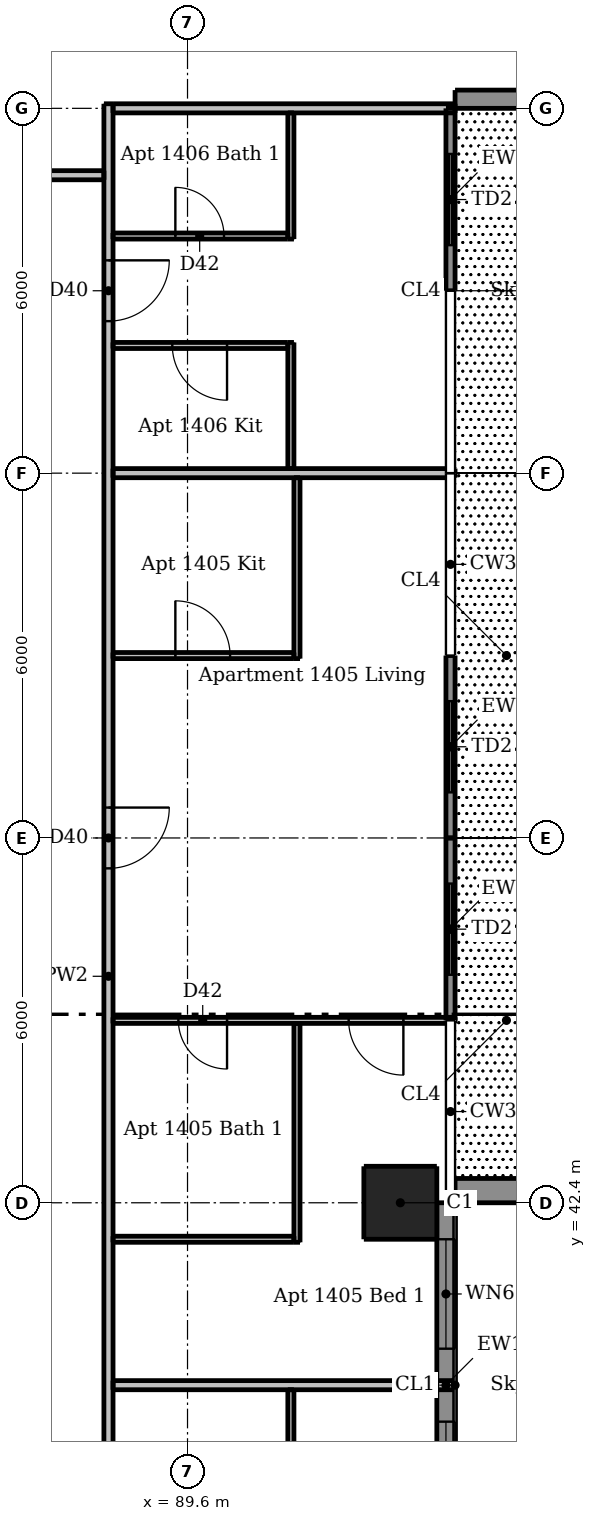
"""IFC4 building model, lengths in metres.
Left out: names, types, materials, properties, quantities, classifications, styles, units other than length and angle.
Written with IfcOpenShell. Run it as: python <this file> out.ifc"""

import sys

from ifc_helpers import new_model, si_unit, direction, frame, frame_2d, origin, origin_2d, place, context, subcontext, project, spatial, rectangle, extrude, element, fill, save


model = new_model("IFC4")
c1 = context("Model", 3, precision=1e-05, world=origin(), true_north=direction((0.0, 1.0)))
c2 = subcontext(c1, "Body", "Model", "MODEL_VIEW")
j1 = project(units=[si_unit("LENGTHUNIT", "METRE"), si_unit("PLANEANGLEUNIT", "RADIAN")], contexts=[c1])
p1 = place(None, origin())
s1 = spatial("IfcSite", under=j1, at=p1, CompositionType="ELEMENT")
p2 = place(p1, origin())
s2 = spatial("IfcBuilding", under=s1, at=p2, CompositionType="ELEMENT")
p3 = place(p2, frame((0.0, 0.0, 53.2)))
s3 = spatial("IfcBuildingStorey", under=s2, at=p3, CompositionType="ELEMENT", Elevation=53.2)
p4 = place(p3, frame((93.1, 42.4, 0.0), z_axis=(0.0, 0.0, 1.0), x_axis=(1.0, 0.0, 0.0)))
e1 = element("IfcColumn", 1, at=p4, inside=s3, PredefinedType="COLUMN", context=c2, shape_type="SweptSolid", body=[
    extrude(rectangle(XDim=1.2, YDim=1.2, at=origin_2d()), origin(), (0.0, 0.0, 1.0), 3.05),
])
p5 = place(p3, frame((94.0, 60.55, 0.0), z_axis=(0.0, 0.0, 1.0), x_axis=(1.0, 0.0, 0.0)))
e2 = element("IfcWall", 2, at=p5, inside=s3, PredefinedType="SOLIDWALL", context=c2, shape_type="SweptSolid", body=[
    extrude(rectangle(XDim=4.5, YDim=0.3, at=frame_2d((2.25, 0.0))), origin(), (0.0, 0.0, 1.0), 3.05),
])
p6 = place(p5, frame((1.05, 0.0, 0.15)))
e3 = element("IfcOpeningElement", 3, at=p6, cuts=e2, PredefinedType="OPENING", context=c2, shape_type="SweptSolid", body=[
    extrude(rectangle(XDim=2.4, YDim=2.1, at=frame_2d((1.2, 1.05))), frame((0.0, 0.16, 0.0), z_axis=(0.0, -1.0, 0.0), x_axis=(1.0, 0.0, 0.0)), (0.0, 0.0, 1.0), 0.32),
])
p7 = place(p3, frame((93.85, 36.4, 0.0), z_axis=(0.0, 0.0, 1.0), x_axis=(0.0, 1.0, 0.0)))
e4 = element("IfcWall", 4, at=p7, inside=s3, PredefinedType="SOLIDWALL", context=c2, shape_type="SweptSolid", body=[
    extrude(rectangle(XDim=6.0, YDim=0.3, at=frame_2d((3.0, 0.0))), origin(), (0.0, 0.0, 1.0), 3.05),
])
p8 = place(p7, frame((0.6, 0.0, 0.15)))
e5 = element("IfcOpeningElement", 5, at=p8, cuts=e4, PredefinedType="OPENING", context=c2, shape_type="SweptSolid", body=[
    extrude(rectangle(XDim=1.8, YDim=2.1, at=frame_2d((0.9, 1.05))), frame((0.0, 0.16, 0.0), z_axis=(0.0, -1.0, 0.0), x_axis=(1.0, 0.0, 0.0)), (0.0, 0.0, 1.0), 0.32),
])
p9 = place(p7, frame((3.6, 0.0, 0.15)))
e6 = element("IfcOpeningElement", 6, at=p9, cuts=e4, PredefinedType="OPENING", context=c2, shape_type="SweptSolid", body=[
    extrude(rectangle(XDim=1.8, YDim=2.1, at=frame_2d((0.9, 1.05))), frame((0.0, 0.16, 0.0), z_axis=(0.0, -1.0, 0.0), x_axis=(1.0, 0.0, 0.0)), (0.0, 0.0, 1.0), 0.32),
])
p10 = place(p3, frame((93.925, 45.4, 0.0), z_axis=(0.0, 0.0, 1.0), x_axis=(0.0, 1.0, 0.0)))
e7 = element("IfcWall", 7, at=p10, inside=s3, PredefinedType="SOLIDWALL", context=c2, shape_type="SweptSolid", body=[
    extrude(rectangle(XDim=3.0, YDim=0.15, at=frame_2d((1.5, 0.0))), origin(), (0.0, 0.0, 1.0), 3.05),
])
p11 = place(p10, frame((0.75, 0.0, 0.0)))
e8 = element("IfcOpeningElement", 8, at=p11, cuts=e7, PredefinedType="OPENING", context=c2, shape_type="SweptSolid", body=[
    extrude(rectangle(XDim=1.5, YDim=2.4, at=frame_2d((0.75, 1.2))), frame((0.0, 0.085, 0.0), z_axis=(0.0, -1.0, 0.0), x_axis=(1.0, 0.0, 0.0)), (0.0, 0.0, 1.0), 0.17),
])
p12 = place(p3, frame((93.925, 48.4, 0.0), z_axis=(0.0, 0.0, 1.0), x_axis=(0.0, 1.0, 0.0)))
e9 = element("IfcWall", 9, at=p12, inside=s3, PredefinedType="SOLIDWALL", context=c2, shape_type="SweptSolid", body=[
    extrude(rectangle(XDim=3.0, YDim=0.15, at=frame_2d((1.5, 0.0))), origin(), (0.0, 0.0, 1.0), 3.05),
])
p13 = place(p12, frame((0.75, 0.0, 0.0)))
e10 = element("IfcOpeningElement", 10, at=p13, cuts=e9, PredefinedType="OPENING", context=c2, shape_type="SweptSolid", body=[
    extrude(rectangle(XDim=1.5, YDim=2.4, at=frame_2d((0.75, 1.2))), frame((0.0, 0.085, 0.0), z_axis=(0.0, -1.0, 0.0), x_axis=(1.0, 0.0, 0.0)), (0.0, 0.0, 1.0), 0.17),
])
p14 = place(p3, frame((93.925, 57.4, 0.0), z_axis=(0.0, 0.0, 1.0), x_axis=(0.0, 1.0, 0.0)))
e11 = element("IfcWall", 11, at=p14, inside=s3, PredefinedType="SOLIDWALL", context=c2, shape_type="SweptSolid", body=[
    extrude(rectangle(XDim=3.0, YDim=0.15, at=frame_2d((1.5, 0.0))), origin(), (0.0, 0.0, 1.0), 3.05),
])
p15 = place(p14, frame((0.75, 0.0, 0.0)))
e12 = element("IfcOpeningElement", 12, at=p15, cuts=e11, PredefinedType="OPENING", context=c2, shape_type="SweptSolid", body=[
    extrude(rectangle(XDim=1.5, YDim=2.4, at=frame_2d((0.75, 1.2))), frame((0.0, 0.085, 0.0), z_axis=(0.0, -1.0, 0.0), x_axis=(1.0, 0.0, 0.0)), (0.0, 0.0, 1.0), 0.17),
])
p16 = place(p3, frame((94.0, 42.6, 0.03), z_axis=(0.0, 0.0, 1.0), x_axis=(1.0, 0.0, 0.0)))
e13 = element("IfcWall", 13, at=p16, inside=s3, PredefinedType="PARAPET", context=c2, shape_type="SweptSolid", body=[
    extrude(rectangle(XDim=2.6, YDim=0.4, at=frame_2d((1.3, 0.0))), origin(), (0.0, 0.0, 1.0), 1.1),
])
p17 = place(p3, frame((91.3, 33.45, 0.0), z_axis=(0.0, 0.0, 1.0), x_axis=(0.0, 1.0, 0.0)))
e14 = element("IfcWall", 14, at=p17, inside=s3, PredefinedType="PARTITIONING", context=c2, shape_type="SweptSolid", body=[
    extrude(rectangle(XDim=5.875, YDim=0.1, at=frame_2d((2.938, 0.0))), origin(), (0.0, 0.0, 1.0), 3.05),
])
p18 = place(p17, frame((3.75, 0.0, 0.0)))
e15 = element("IfcOpeningElement", 15, at=p18, cuts=e14, PredefinedType="OPENING", context=c2, shape_type="SweptSolid", body=[
    extrude(rectangle(XDim=0.8, YDim=2.1, at=frame_2d((0.4, 1.05))), frame((0.0, 0.06, 0.0), z_axis=(0.0, -1.0, 0.0), x_axis=(1.0, 0.0, 0.0)), (0.0, 0.0, 1.0), 0.12),
])
for number, where, z_axis, x_axis in (
    (16, (91.3, 54.475, 0.0), (0.0, 0.0, 1.0), (0.0, 1.0, 0.0)),
    (17, (91.3, 58.25, 0.0), (0.0, 0.0, 1.0), (0.0, 1.0, 0.0)),
):
    element("IfcWall", number, at=place(p3, frame(where, z_axis=z_axis, x_axis=x_axis)), inside=s3, PredefinedType="PARTITIONING", context=c2, shape_type="SweptSolid", body=[
        extrude(rectangle(XDim=2.075, YDim=0.1, at=frame_2d((1.038, 0.0))), origin(), (0.0, 0.0, 1.0), 3.05),
    ])
p19 = place(p3, frame((91.4, 41.75, 0.0), z_axis=(0.0, 0.0, 1.0), x_axis=(0.0, 1.0, 0.0)))
e18 = element("IfcWall", 18, at=p19, inside=s3, PredefinedType="PARTITIONING", context=c2, shape_type="SweptSolid", body=[
    extrude(rectangle(XDim=3.6, YDim=0.1, at=frame_2d((1.8, 0.0))), origin(), (0.0, 0.0, 1.0), 3.05),
])
p20 = place(p3, frame((91.4, 51.35, 0.0), z_axis=(0.0, 0.0, 1.0), x_axis=(0.0, 1.0, 0.0)))
e19 = element("IfcWall", 19, at=p20, inside=s3, PredefinedType="PARTITIONING", context=c2, shape_type="SweptSolid", body=[
    extrude(rectangle(XDim=2.975, YDim=0.1, at=frame_2d((1.487, 0.0))), origin(), (0.0, 0.0, 1.0), 3.05),
])
p21 = place(p3, frame((88.375, 58.3, 0.0), z_axis=(0.0, 0.0, 1.0), x_axis=(1.0, 0.0, 0.0)))
e20 = element("IfcWall", 20, at=p21, inside=s3, PredefinedType="PARTITIONING", context=c2, shape_type="SweptSolid", body=[
    extrude(rectangle(XDim=2.875, YDim=0.1, at=frame_2d((1.438, 0.0))), origin(), (0.0, 0.0, 1.0), 3.05),
])
p22 = place(p21, frame((1.025, 0.0, 0.0)))
e21 = element("IfcOpeningElement", 21, at=p22, cuts=e20, PredefinedType="OPENING", context=c2, shape_type="SweptSolid", body=[
    extrude(rectangle(XDim=0.8, YDim=2.1, at=frame_2d((0.4, 1.05))), frame((0.0, 0.06, 0.0), z_axis=(0.0, -1.0, 0.0), x_axis=(1.0, 0.0, 0.0)), (0.0, 0.0, 1.0), 0.12),
])
p23 = place(p3, frame((91.25, 56.5, 0.0), z_axis=(0.0, 0.0, 1.0), x_axis=(-1.0, 0.0, 0.0)))
e22 = element("IfcWall", 22, at=p23, inside=s3, PredefinedType="PARTITIONING", context=c2, shape_type="SweptSolid", body=[
    extrude(rectangle(XDim=2.875, YDim=0.1, at=frame_2d((1.438, 0.0))), origin(), (0.0, 0.0, 1.0), 3.05),
])
p24 = place(p23, frame((1.0, 0.0, 0.0)))
e23 = element("IfcOpeningElement", 23, at=p24, cuts=e22, PredefinedType="OPENING", context=c2, shape_type="SweptSolid", body=[
    extrude(rectangle(XDim=0.9, YDim=2.1, at=frame_2d((0.45, 1.05))), frame((0.0, 0.06, 0.0), z_axis=(0.0, -1.0, 0.0), x_axis=(1.0, 0.0, 0.0)), (0.0, 0.0, 1.0), 0.12),
])
p25 = place(p3, frame((88.375, 51.4, 0.0), z_axis=(0.0, 0.0, 1.0), x_axis=(1.0, 0.0, 0.0)))
e24 = element("IfcWall", 24, at=p25, inside=s3, PredefinedType="PARTITIONING", context=c2, shape_type="SweptSolid", body=[
    extrude(rectangle(XDim=2.975, YDim=0.1, at=frame_2d((1.488, 0.0))), origin(), (0.0, 0.0, 1.0), 3.05),
])
p26 = place(p25, frame((1.025, 0.0, 0.0)))
e25 = element("IfcOpeningElement", 25, at=p26, cuts=e24, PredefinedType="OPENING", context=c2, shape_type="SweptSolid", body=[
    extrude(rectangle(XDim=0.9, YDim=2.1, at=frame_2d((0.45, 1.05))), frame((0.0, 0.06, 0.0), z_axis=(0.0, -1.0, 0.0), x_axis=(1.0, 0.0, 0.0)), (0.0, 0.0, 1.0), 0.12),
])
p27 = place(p3, frame((94.0, 45.4, 0.0), z_axis=(0.0, 0.0, 1.0), x_axis=(-1.0, 0.0, 0.0)))
e26 = element("IfcWall", 26, at=p27, inside=s3, PredefinedType="PARTITIONING", context=c2, shape_type="SweptSolid", body=[
    extrude(rectangle(XDim=5.625, YDim=0.1, at=frame_2d((2.812, 0.0))), origin(), (0.0, 0.0, 1.0), 3.05),
])
p28 = place(p27, frame((0.85, 0.0, 0.0)))
e27 = element("IfcOpeningElement", 27, at=p28, cuts=e26, PredefinedType="OPENING", context=c2, shape_type="SweptSolid", body=[
    extrude(rectangle(XDim=0.9, YDim=2.1, at=frame_2d((0.45, 1.05))), frame((0.0, 0.06, 0.0), z_axis=(0.0, -1.0, 0.0), x_axis=(1.0, 0.0, 0.0)), (0.0, 0.0, 1.0), 0.12),
])
p29 = place(p27, frame((3.75, 0.0, 0.0)))
e28 = element("IfcOpeningElement", 28, at=p29, cuts=e26, PredefinedType="OPENING", context=c2, shape_type="SweptSolid", body=[
    extrude(rectangle(XDim=0.8, YDim=2.1, at=frame_2d((0.4, 1.05))), frame((0.0, 0.06, 0.0), z_axis=(0.0, -1.0, 0.0), x_axis=(1.0, 0.0, 0.0)), (0.0, 0.0, 1.0), 0.12),
])
p30 = place(p3, frame((88.375, 41.8, 0.0), z_axis=(0.0, 0.0, 1.0), x_axis=(1.0, 0.0, 0.0)))
e29 = element("IfcWall", 29, at=p30, inside=s3, PredefinedType="PARTITIONING", context=c2, shape_type="SweptSolid", body=[
    extrude(rectangle(XDim=2.975, YDim=0.1, at=frame_2d((1.488, 0.0))), origin(), (0.0, 0.0, 1.0), 3.05),
])
p31 = place(p3, frame((88.3, 60.475, 0.0), z_axis=(0.0, 0.0, 1.0), x_axis=(0.0, -1.0, 0.0)))
e30 = element("IfcWall", 30, at=p31, inside=s3, PredefinedType="PARTITIONING", context=c2, shape_type="SweptSolid", body=[
    extrude(rectangle(XDim=28.7, YDim=0.15, at=frame_2d((14.35, 0.0))), origin(), (0.0, 0.0, 1.0), 3.05),
])
p32 = place(p31, frame((27.425, 0.0, 0.0)))
e31 = element("IfcOpeningElement", 31, at=p32, cuts=e30, PredefinedType="OPENING", context=c2, shape_type="SweptSolid", body=[
    extrude(rectangle(XDim=1.0, YDim=2.1, at=frame_2d((0.5, 1.05))), frame((0.0, 0.085, 0.0), z_axis=(0.0, -1.0, 0.0), x_axis=(1.0, 0.0, 0.0)), (0.0, 0.0, 1.0), 0.17),
])
p33 = place(p31, frame((11.575, 0.0, 0.0)))
e32 = element("IfcOpeningElement", 32, at=p33, cuts=e30, PredefinedType="OPENING", context=c2, shape_type="SweptSolid", body=[
    extrude(rectangle(XDim=1.0, YDim=2.1, at=frame_2d((0.5, 1.05))), frame((0.0, 0.085, 0.0), z_axis=(0.0, -1.0, 0.0), x_axis=(1.0, 0.0, 0.0)), (0.0, 0.0, 1.0), 0.17),
])
p34 = place(p31, frame((2.575, 0.0, 0.0)))
e33 = element("IfcOpeningElement", 33, at=p34, cuts=e30, PredefinedType="OPENING", context=c2, shape_type="SweptSolid", body=[
    extrude(rectangle(XDim=1.0, YDim=2.1, at=frame_2d((0.5, 1.05))), frame((0.0, 0.085, 0.0), z_axis=(0.0, -1.0, 0.0), x_axis=(1.0, 0.0, 0.0)), (0.0, 0.0, 1.0), 0.17),
])
p35 = place(p3, frame((88.375, 60.4, 0.0), z_axis=(0.0, 0.0, 1.0), x_axis=(1.0, 0.0, 0.0)))
e34 = element("IfcWall", 34, at=p35, inside=s3, PredefinedType="PARTITIONING", context=c2, shape_type="SweptSolid", body=[
    extrude(rectangle(XDim=5.625, YDim=0.15, at=frame_2d((2.812, 0.0))), origin(), (0.0, 0.0, 1.0), 2.516),
])
p36 = place(p3, frame((59.675, 59.3, 0.0), z_axis=(0.0, 0.0, 1.0), x_axis=(1.0, 0.0, 0.0)))
e35 = element("IfcWall", 35, at=p36, inside=s3, PredefinedType="PARTITIONING", context=c2, shape_type="SweptSolid", body=[
    extrude(rectangle(XDim=28.55, YDim=0.15, at=frame_2d((14.275, 0.0))), origin(), (0.0, 0.0, 1.0), 3.05),
])
p37 = place(p36, frame((6.925, 0.0, 0.0)))
e36 = element("IfcOpeningElement", 36, at=p37, cuts=e35, PredefinedType="OPENING", context=c2, shape_type="SweptSolid", body=[
    extrude(rectangle(XDim=1.0, YDim=2.1, at=frame_2d((0.5, 1.05))), frame((0.0, 0.085, 0.0), z_axis=(0.0, -1.0, 0.0), x_axis=(1.0, 0.0, 0.0)), (0.0, 0.0, 1.0), 0.17),
])
p38 = place(p36, frame((25.775, 0.0, 0.0)))
e37 = element("IfcOpeningElement", 37, at=p38, cuts=e35, PredefinedType="OPENING", context=c2, shape_type="SweptSolid", body=[
    extrude(rectangle(XDim=1.0, YDim=2.1, at=frame_2d((0.5, 1.05))), frame((0.0, 0.085, 0.0), z_axis=(0.0, -1.0, 0.0), x_axis=(1.0, 0.0, 0.0)), (0.0, 0.0, 1.0), 0.17),
])
p39 = place(p3, frame((88.375, 54.4, 0.0), z_axis=(0.0, 0.0, 1.0), x_axis=(1.0, 0.0, 0.0)))
e38 = element("IfcWall", 38, at=p39, inside=s3, PredefinedType="PARTITIONING", context=c2, shape_type="SweptSolid", body=[
    extrude(rectangle(XDim=5.625, YDim=0.15, at=frame_2d((2.812, 0.0))), origin(), (0.0, 0.0, 1.0), 2.516),
])
p40 = place(p3, frame((88.375, 39.4, 0.0), z_axis=(0.0, 0.0, 1.0), x_axis=(1.0, 0.0, 0.0)))
e39 = element("IfcWall", 39, at=p40, inside=s3, PredefinedType="PARTITIONING", context=c2, shape_type="SweptSolid", body=[
    extrude(rectangle(XDim=5.625, YDim=0.15, at=frame_2d((2.812, 0.0))), origin(), (0.0, 0.0, 1.0), 3.05),
])
p41 = place(p8, origin())
e40 = element("IfcWindow", 40, at=p41, inside=s3, PartitioningType="DOUBLE_PANEL_VERTICAL", PredefinedType="WINDOW", context=c2, shape_type="SweptSolid", body=[
    extrude(rectangle(XDim=1.8, YDim=2.1, at=frame_2d((0.9, 1.05))), frame((0.0, 0.03, 0.0), z_axis=(0.0, -1.0, 0.0), x_axis=(1.0, 0.0, 0.0)), (0.0, 0.0, 1.0), 0.06),
])
fill(e5, e40)
p42 = place(p9, origin())
e41 = element("IfcWindow", 41, at=p42, inside=s3, PartitioningType="DOUBLE_PANEL_VERTICAL", PredefinedType="WINDOW", context=c2, shape_type="SweptSolid", body=[
    extrude(rectangle(XDim=1.8, YDim=2.1, at=frame_2d((0.9, 1.05))), frame((0.0, 0.03, 0.0), z_axis=(0.0, -1.0, 0.0), x_axis=(1.0, 0.0, 0.0)), (0.0, 0.0, 1.0), 0.06),
])
fill(e6, e41)
p43 = place(p11, origin())
e42 = element("IfcDoor", 42, at=p43, inside=s3, OperationType="DOUBLE_DOOR_SLIDING", PredefinedType="DOOR", context=c2, shape_type="SweptSolid", body=[
    extrude(rectangle(XDim=1.5, YDim=2.4, at=frame_2d((0.75, 1.2))), frame((0.0, 0.025, 0.0), z_axis=(0.0, -1.0, 0.0), x_axis=(1.0, 0.0, 0.0)), (0.0, 0.0, 1.0), 0.05),
])
fill(e8, e42)
p44 = place(p13, origin())
e43 = element("IfcDoor", 43, at=p44, inside=s3, OperationType="DOUBLE_DOOR_SLIDING", PredefinedType="DOOR", context=c2, shape_type="SweptSolid", body=[
    extrude(rectangle(XDim=1.5, YDim=2.4, at=frame_2d((0.75, 1.2))), frame((0.0, 0.025, 0.0), z_axis=(0.0, -1.0, 0.0), x_axis=(1.0, 0.0, 0.0)), (0.0, 0.0, 1.0), 0.05),
])
fill(e10, e43)
p45 = place(p15, origin())
e44 = element("IfcDoor", 44, at=p45, inside=s3, OperationType="DOUBLE_DOOR_SLIDING", PredefinedType="DOOR", context=c2, shape_type="SweptSolid", body=[
    extrude(rectangle(XDim=1.5, YDim=2.4, at=frame_2d((0.75, 1.2))), frame((0.0, 0.025, 0.0), z_axis=(0.0, -1.0, 0.0), x_axis=(1.0, 0.0, 0.0)), (0.0, 0.0, 1.0), 0.05),
])
fill(e12, e44)
p46 = place(p33, origin())
e45 = element("IfcDoor", 45, at=p46, inside=s3, OperationType="SINGLE_SWING_LEFT", PredefinedType="DOOR", context=c2, shape_type="SweptSolid", body=[
    extrude(rectangle(XDim=1.0, YDim=2.1, at=frame_2d((0.5, 1.05))), frame((0.0, 0.025, 0.0), z_axis=(0.0, -1.0, 0.0), x_axis=(1.0, 0.0, 0.0)), (0.0, 0.0, 1.0), 0.05),
])
fill(e32, e45)
p47 = place(p26, origin())
e46 = element("IfcDoor", 46, at=p47, inside=s3, OperationType="SINGLE_SWING_LEFT", PredefinedType="DOOR", context=c2, shape_type="SweptSolid", body=[
    extrude(rectangle(XDim=0.9, YDim=2.1, at=frame_2d((0.45, 1.05))), frame((0.0, 0.025, 0.0), z_axis=(0.0, -1.0, 0.0), x_axis=(1.0, 0.0, 0.0)), (0.0, 0.0, 1.0), 0.05),
])
fill(e25, e46)
p48 = place(p28, origin())
e47 = element("IfcDoor", 47, at=p48, inside=s3, OperationType="SINGLE_SWING_LEFT", PredefinedType="DOOR", context=c2, shape_type="SweptSolid", body=[
    extrude(rectangle(XDim=0.9, YDim=2.1, at=frame_2d((0.45, 1.05))), frame((0.0, 0.025, 0.0), z_axis=(0.0, -1.0, 0.0), x_axis=(1.0, 0.0, 0.0)), (0.0, 0.0, 1.0), 0.05),
])
fill(e27, e47)
p49 = place(p29, origin())
e48 = element("IfcDoor", 48, at=p49, inside=s3, OperationType="SINGLE_SWING_LEFT", PredefinedType="DOOR", context=c2, shape_type="SweptSolid", body=[
    extrude(rectangle(XDim=0.8, YDim=2.1, at=frame_2d((0.4, 1.05))), frame((0.0, 0.025, 0.0), z_axis=(0.0, -1.0, 0.0), x_axis=(1.0, 0.0, 0.0)), (0.0, 0.0, 1.0), 0.05),
])
fill(e28, e48)
p50 = place(p34, origin())
e49 = element("IfcDoor", 49, at=p50, inside=s3, OperationType="SINGLE_SWING_LEFT", PredefinedType="DOOR", context=c2, shape_type="SweptSolid", body=[
    extrude(rectangle(XDim=1.0, YDim=2.1, at=frame_2d((0.5, 1.05))), frame((0.0, 0.025, 0.0), z_axis=(0.0, -1.0, 0.0), x_axis=(1.0, 0.0, 0.0)), (0.0, 0.0, 1.0), 0.05),
])
fill(e33, e49)
p51 = place(p24, origin())
e50 = element("IfcDoor", 50, at=p51, inside=s3, OperationType="SINGLE_SWING_LEFT", PredefinedType="DOOR", context=c2, shape_type="SweptSolid", body=[
    extrude(rectangle(XDim=0.9, YDim=2.1, at=frame_2d((0.45, 1.05))), frame((0.0, 0.025, 0.0), z_axis=(0.0, -1.0, 0.0), x_axis=(1.0, 0.0, 0.0)), (0.0, 0.0, 1.0), 0.05),
])
fill(e23, e50)
p52 = place(p22, origin())
e51 = element("IfcDoor", 51, at=p52, inside=s3, OperationType="SINGLE_SWING_LEFT", PredefinedType="DOOR", context=c2, shape_type="SweptSolid", body=[
    extrude(rectangle(XDim=0.8, YDim=2.1, at=frame_2d((0.4, 1.05))), frame((0.0, 0.025, 0.0), z_axis=(0.0, -1.0, 0.0), x_axis=(1.0, 0.0, 0.0)), (0.0, 0.0, 1.0), 0.05),
])
fill(e21, e51)
save(model, sys.argv[1])
